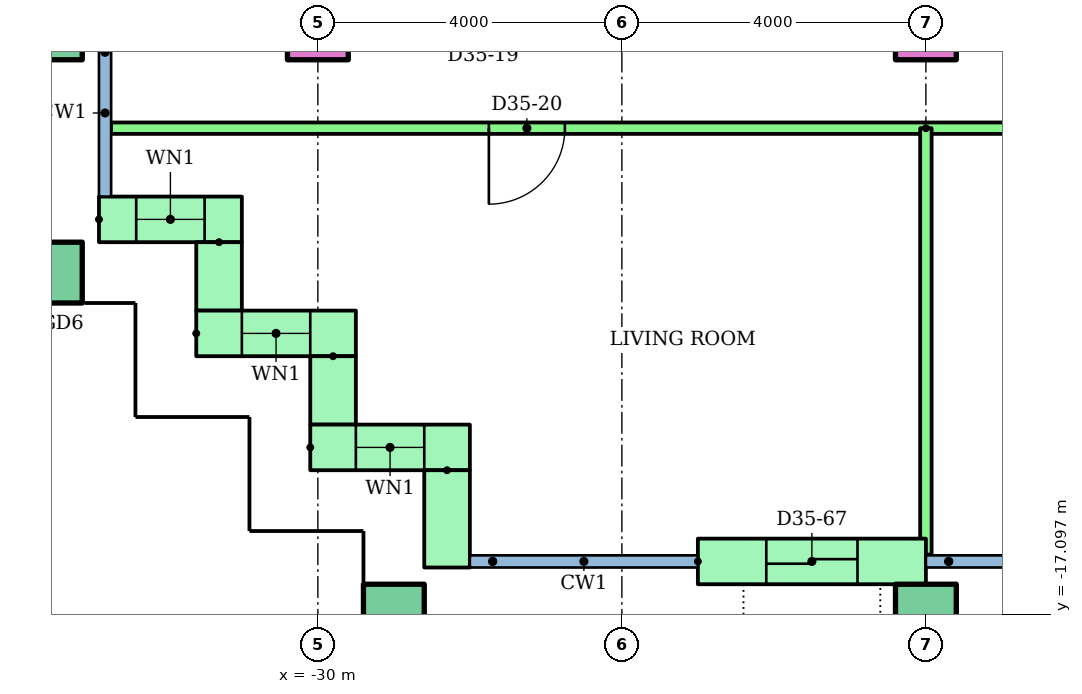
"""IFC4 building model, lengths in metres.
Left out: names, types, materials, properties, quantities, classifications, styles, units other than length and angle.
Written with IfcOpenShell. Run it as: python <this file> out.ifc"""

import sys

from ifc_helpers import new_model, si_unit, direction, frame, frame_2d, origin, origin_2d, place, context, subcontext, project, spatial, rectangle, hollow_rectangle, extrude, element, fill, save


model = new_model("IFC4")
c1 = context("Model", 3, precision=1e-05, world=origin(), true_north=direction((0.0, 1.0)))
c2 = subcontext(c1, "Body", "Model", "MODEL_VIEW")
j1 = project(units=[si_unit("LENGTHUNIT", "METRE"), si_unit("PLANEANGLEUNIT", "RADIAN")], contexts=[c1])
p1 = place(None, origin())
s1 = spatial("IfcSite", under=j1, at=p1, CompositionType="ELEMENT")
p2 = place(p1, origin())
s2 = spatial("IfcBuilding", under=s1, at=p2, CompositionType="ELEMENT")
p3 = place(p2, frame((0.0, 0.0, 135.8)))
s3 = spatial("IfcBuildingStorey", under=s2, at=p3, CompositionType="ELEMENT", Elevation=135.8)
for number, where in (
    (1, (-29.0, -17.1, 0.0)),
    (2, (-22.0, -17.1, 0.0)),
    (3, (-33.5, -12.6, 0.0)),
    (4, (-33.5, -9.4, 0.0)),
):
    element("IfcColumn", number, at=place(p3, frame(where)), inside=s3, PredefinedType="COLUMN", context=c2, shape_type="SweptSolid", body=[
        extrude(hollow_rectangle(XDim=0.8, YDim=0.8, WallThickness=0.04, at=origin_2d()), origin(), (0.0, 0.0, 1.0), 3.2),
    ])
for number, where in (
    (5, (-30.0, -9.4, 0.0)),
    (6, (-22.0, -9.4, 0.0)),
):
    element("IfcColumn", number, at=place(p3, frame(where)), inside=s3, PredefinedType="COLUMN", context=c2, shape_type="SweptSolid", body=[
        extrude(rectangle(XDim=0.8, YDim=0.8, at=origin_2d()), origin(), (0.0, 0.0, 1.0), 3.2),
    ])
p4 = place(p3, frame((-32.88, -11.9, 0.0)))
e7 = element("IfcWall", 7, at=p4, inside=s3, PredefinedType="STANDARD", context=c2, shape_type="SweptSolid", body=[
    extrude(rectangle(XDim=1.88, YDim=0.6, at=frame_2d((0.94, 0.0))), origin(), (0.0, 0.0, 1.0), 2.92),
])
p5 = place(p4, frame((0.49, 0.0, 0.9)))
e8 = element("IfcOpeningElement", 8, at=p5, cuts=e7, PredefinedType="OPENING", context=c2, shape_type="SweptSolid", body=[
    extrude(rectangle(XDim=0.9, YDim=1.5, at=frame_2d((0.45, 0.75))), frame((0.0, 0.31, 0.0), z_axis=(0.0, -1.0, 0.0), x_axis=(1.0, 0.0, 0.0)), (0.0, 0.0, 1.0), 0.62),
])
p6 = place(p3, frame((-31.3, -12.2, 0.0), z_axis=(0.0, 0.0, 1.0), x_axis=(0.0, -1.0, 0.0)))
e9 = element("IfcWall", 9, at=p6, inside=s3, PredefinedType="STANDARD", context=c2, shape_type="SweptSolid", body=[
    extrude(rectangle(XDim=0.9, YDim=0.6, at=frame_2d((0.45, 0.0))), origin(), (0.0, 0.0, 1.0), 2.92),
])
p7 = place(p3, frame((-31.6, -13.4, 0.0)))
e10 = element("IfcWall", 10, at=p7, inside=s3, PredefinedType="STANDARD", context=c2, shape_type="SweptSolid", body=[
    extrude(rectangle(XDim=2.1, YDim=0.6, at=frame_2d((1.05, 0.0))), origin(), (0.0, 0.0, 1.0), 2.92),
])
p8 = place(p7, frame((0.6, 0.0, 0.9)))
e11 = element("IfcOpeningElement", 11, at=p8, cuts=e10, PredefinedType="OPENING", context=c2, shape_type="SweptSolid", body=[
    extrude(rectangle(XDim=0.9, YDim=1.5, at=frame_2d((0.45, 0.75))), frame((0.0, 0.31, 0.0), z_axis=(0.0, -1.0, 0.0), x_axis=(1.0, 0.0, 0.0)), (0.0, 0.0, 1.0), 0.62),
])
p9 = place(p3, frame((-29.8, -13.7, 0.0), z_axis=(0.0, 0.0, 1.0), x_axis=(0.0, -1.0, 0.0)))
e12 = element("IfcWall", 12, at=p9, inside=s3, PredefinedType="STANDARD", context=c2, shape_type="SweptSolid", body=[
    extrude(rectangle(XDim=0.9, YDim=0.6, at=frame_2d((0.45, 0.0))), origin(), (0.0, 0.0, 1.0), 2.92),
])
p10 = place(p3, frame((-30.1, -14.9, 0.0)))
e13 = element("IfcWall", 13, at=p10, inside=s3, PredefinedType="STANDARD", context=c2, shape_type="SweptSolid", body=[
    extrude(rectangle(XDim=2.1, YDim=0.6, at=frame_2d((1.05, 0.0))), origin(), (0.0, 0.0, 1.0), 2.92),
])
p11 = place(p10, frame((0.6, 0.0, 0.9)))
e14 = element("IfcOpeningElement", 14, at=p11, cuts=e13, PredefinedType="OPENING", context=c2, shape_type="SweptSolid", body=[
    extrude(rectangle(XDim=0.9, YDim=1.5, at=frame_2d((0.45, 0.75))), frame((0.0, 0.31, 0.0), z_axis=(0.0, -1.0, 0.0), x_axis=(1.0, 0.0, 0.0)), (0.0, 0.0, 1.0), 0.62),
])
p12 = place(p3, frame((-28.3, -15.2, 0.0), z_axis=(0.0, 0.0, 1.0), x_axis=(0.0, -1.0, 0.0)))
e15 = element("IfcWall", 15, at=p12, inside=s3, PredefinedType="STANDARD", context=c2, shape_type="SweptSolid", body=[
    extrude(rectangle(XDim=1.28, YDim=0.6, at=frame_2d((0.64, 0.0))), origin(), (0.0, 0.0, 1.0), 2.92),
])
p13 = place(p3, frame((-25.0, -16.4, 0.0)))
e16 = element("IfcWall", 16, at=p13, inside=s3, PredefinedType="STANDARD", context=c2, shape_type="SweptSolid", body=[
    extrude(rectangle(XDim=3.0, YDim=0.6, at=frame_2d((1.5, 0.0))), origin(), (0.0, 0.0, 1.0), 2.92),
])
p14 = place(p13, frame((0.9, 0.0, 0.0)))
e17 = element("IfcOpeningElement", 17, at=p14, cuts=e16, PredefinedType="OPENING", context=c2, shape_type="SweptSolid", body=[
    extrude(rectangle(XDim=1.2, YDim=2.1, at=frame_2d((0.6, 1.05))), frame((0.0, 0.31, 0.0), z_axis=(0.0, -1.0, 0.0), x_axis=(1.0, 0.0, 0.0)), (0.0, 0.0, 1.0), 0.62),
])
p15 = place(p3, frame((-6.0, -10.7, 0.0), z_axis=(0.0, 0.0, 1.0), x_axis=(-1.0, 0.0, 0.0)))
e18 = element("IfcWall", 18, at=p15, inside=s3, PredefinedType="PARTITIONING", context=c2, shape_type="SweptSolid", body=[
    extrude(rectangle(XDim=26.72, YDim=0.15, at=frame_2d((13.36, 0.0))), origin(), (0.0, 0.0, 1.0), 2.4),
])
p16 = place(p15, frame((20.75, 0.0, 0.0)))
e19 = element("IfcOpeningElement", 19, at=p16, cuts=e18, PredefinedType="OPENING", context=c2, shape_type="SweptSolid", body=[
    extrude(rectangle(XDim=1.0, YDim=2.1, at=frame_2d((0.5, 1.05))), frame((0.0, 0.085, 0.0), z_axis=(0.0, -1.0, 0.0), x_axis=(1.0, 0.0, 0.0)), (0.0, 0.0, 1.0), 0.17),
])
p17 = place(p15, frame((13.55, 0.0, 0.0)))
e20 = element("IfcOpeningElement", 20, at=p17, cuts=e18, PredefinedType="OPENING", context=c2, shape_type="SweptSolid", body=[
    extrude(rectangle(XDim=0.9, YDim=2.1, at=frame_2d((0.45, 1.05))), frame((0.0, 0.085, 0.0), z_axis=(0.0, -1.0, 0.0), x_axis=(1.0, 0.0, 0.0)), (0.0, 0.0, 1.0), 0.17),
])
p18 = place(p15, frame((9.55, 0.0, 0.0)))
e21 = element("IfcOpeningElement", 21, at=p18, cuts=e18, PredefinedType="OPENING", context=c2, shape_type="SweptSolid", body=[
    extrude(rectangle(XDim=0.9, YDim=2.1, at=frame_2d((0.45, 1.05))), frame((0.0, 0.085, 0.0), z_axis=(0.0, -1.0, 0.0), x_axis=(1.0, 0.0, 0.0)), (0.0, 0.0, 1.0), 0.17),
])
p19 = place(p15, frame((5.55, 0.0, 0.0)))
e22 = element("IfcOpeningElement", 22, at=p19, cuts=e18, PredefinedType="OPENING", context=c2, shape_type="SweptSolid", body=[
    extrude(rectangle(XDim=0.9, YDim=2.1, at=frame_2d((0.45, 1.05))), frame((0.0, 0.085, 0.0), z_axis=(0.0, -1.0, 0.0), x_axis=(1.0, 0.0, 0.0)), (0.0, 0.0, 1.0), 0.17),
])
p20 = place(p15, frame((1.55, 0.0, 0.0)))
e23 = element("IfcOpeningElement", 23, at=p20, cuts=e18, PredefinedType="OPENING", context=c2, shape_type="SweptSolid", body=[
    extrude(rectangle(XDim=0.9, YDim=2.1, at=frame_2d((0.45, 1.05))), frame((0.0, 0.085, 0.0), z_axis=(0.0, -1.0, 0.0), x_axis=(1.0, 0.0, 0.0)), (0.0, 0.0, 1.0), 0.17),
])
p21 = place(p3, frame((-22.0, -10.7, 0.0), z_axis=(0.0, 0.0, 1.0), x_axis=(0.0, -1.0, 0.0)))
e24 = element("IfcWall", 24, at=p21, inside=s3, PredefinedType="PARTITIONING", context=c2, shape_type="SweptSolid", body=[
    extrude(rectangle(XDim=5.61, YDim=0.15, at=frame_2d((2.805, 0.0))), origin(), (0.0, 0.0, 1.0), 2.4),
])
p22 = place(p5, origin())
e25 = element("IfcWindow", 25, at=p22, inside=s3, PartitioningType="SINGLE_PANEL", PredefinedType="WINDOW", context=c2, shape_type="SweptSolid", body=[
    extrude(rectangle(XDim=0.9, YDim=1.5, at=frame_2d((0.45, 0.75))), frame((0.0, 0.03, 0.0), z_axis=(0.0, -1.0, 0.0), x_axis=(1.0, 0.0, 0.0)), (0.0, 0.0, 1.0), 0.06),
])
fill(e8, e25)
p23 = place(p8, origin())
e26 = element("IfcWindow", 26, at=p23, inside=s3, PartitioningType="SINGLE_PANEL", PredefinedType="WINDOW", context=c2, shape_type="SweptSolid", body=[
    extrude(rectangle(XDim=0.9, YDim=1.5, at=frame_2d((0.45, 0.75))), frame((0.0, 0.03, 0.0), z_axis=(0.0, -1.0, 0.0), x_axis=(1.0, 0.0, 0.0)), (0.0, 0.0, 1.0), 0.06),
])
fill(e11, e26)
p24 = place(p11, origin())
e27 = element("IfcWindow", 27, at=p24, inside=s3, PartitioningType="SINGLE_PANEL", PredefinedType="WINDOW", context=c2, shape_type="SweptSolid", body=[
    extrude(rectangle(XDim=0.9, YDim=1.5, at=frame_2d((0.45, 0.75))), frame((0.0, 0.03, 0.0), z_axis=(0.0, -1.0, 0.0), x_axis=(1.0, 0.0, 0.0)), (0.0, 0.0, 1.0), 0.06),
])
fill(e14, e27)
p25 = place(p16, origin())
e28 = element("IfcDoor", 28, at=p25, inside=s3, OperationType="SINGLE_SWING_RIGHT", PredefinedType="DOOR", context=c2, shape_type="SweptSolid", body=[
    extrude(rectangle(XDim=1.0, YDim=2.1, at=frame_2d((0.5, 1.05))), frame((0.0, 0.025, 0.0), z_axis=(0.0, -1.0, 0.0), x_axis=(1.0, 0.0, 0.0)), (0.0, 0.0, 1.0), 0.05),
])
fill(e19, e28)
p26 = place(p14, origin())
e29 = element("IfcDoor", 29, at=p26, inside=s3, OperationType="SLIDING_TO_LEFT", PredefinedType="DOOR", context=c2, shape_type="SweptSolid", body=[
    extrude(rectangle(XDim=1.2, YDim=2.1, at=frame_2d((0.6, 1.05))), frame((0.0, 0.025, 0.0), z_axis=(0.0, -1.0, 0.0), x_axis=(1.0, 0.0, 0.0)), (0.0, 0.0, 1.0), 0.05),
])
fill(e17, e29)
save(model, sys.argv[1])
